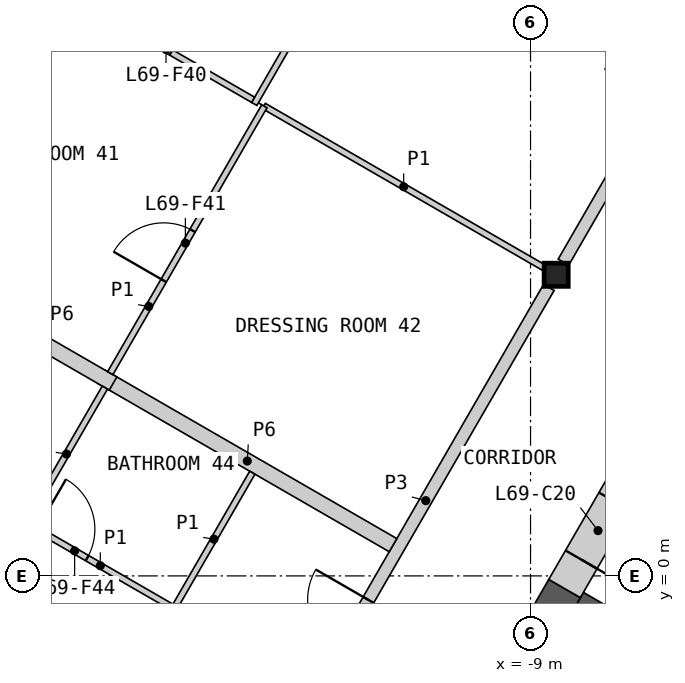
"""IFC4 building model, lengths in metres.
Left out: names, types, materials, properties, quantities, classifications, styles, units other than length and angle.
Written with IfcOpenShell. Run it as: python <this file> out.ifc"""

import sys

from ifc_helpers import new_model, si_unit, direction, frame, frame_2d, origin, origin_2d, place, context, subcontext, project, spatial, polyline, rectangle, i_section, outline, extrude, element, fill, save


model = new_model("IFC4")
c1 = context("Model", 3, precision=1e-05, world=origin(), true_north=direction((0.0, 1.0)))
c2 = subcontext(c1, "Body", "Model", "MODEL_VIEW")
j1 = project(units=[si_unit("LENGTHUNIT", "METRE"), si_unit("PLANEANGLEUNIT", "RADIAN")], contexts=[c1])
p1 = place(None, origin())
s1 = spatial("IfcSite", under=j1, at=p1, CompositionType="ELEMENT")
p2 = place(p1, origin())
s2 = spatial("IfcBuilding", under=s1, at=p2, CompositionType="ELEMENT")
p3 = place(p2, frame((0.0, 0.0, 315.4)))
s3 = spatial("IfcBuildingStorey", under=s2, at=p3, CompositionType="ELEMENT", Elevation=315.4)
p4 = place(p3, frame((-8.578, 4.953, 0.0), z_axis=(0.0, 0.0, 1.0), x_axis=(1.0, 0.0, 0.0)))
e1 = element("IfcColumn", 1, at=p4, inside=s3, PredefinedType="COLUMN", context=c2, shape_type="SweptSolid", body=[
    extrude(i_section(OverallWidth=0.396, OverallDepth=0.381, WebThickness=0.019, FlangeThickness=0.03, at=origin_2d()), origin(), (0.0, 0.0, 1.0), 3.4),
])
p5 = place(p3, origin())
e2 = element("IfcWall", 2, at=p5, inside=s3, PredefinedType="SHEAR", context=c2, shape_type="SweptSolid", body=[
    extrude(outline(polyline([(-6.061, -1.697), (-8.231, -0.444), (-8.131, -0.271), (-5.96, -1.524), (-6.061, -1.697)])), origin(), (0.0, 0.0, 1.0), 3.1),
])
p6 = place(p3, frame((-8.44, -0.208, 0.0), z_axis=(0.0, 0.0, 1.0), x_axis=(-0.500007425856, -0.866021116422, 0.0)))
e3 = element("IfcWall", 3, at=p6, inside=s3, PredefinedType="SHEAR", context=c2, shape_type="SweptSolid", body=[
    extrude(rectangle(XDim=4.969, YDim=0.6, at=frame_2d((2.484, 0.0))), origin(), (0.0, 0.0, 1.0), 3.1),
])
p7 = place(p3, frame((-7.34, 1.698, 0.0), z_axis=(0.0, 0.0, 1.0), x_axis=(-0.50002983664, -0.866008176907, 0.0)))
e4 = element("IfcWall", 4, at=p7, inside=s3, PredefinedType="SHEAR", context=c2, shape_type="SweptSolid", body=[
    extrude(rectangle(XDim=2.2, YDim=0.6, at=frame_2d((1.1, 0.0))), origin(), (0.0, 0.0, 1.0), 3.1),
])
p8 = place(p7, frame((0.55, 0.0, 0.0)))
e5 = element("IfcOpeningElement", 5, at=p8, cuts=e4, PredefinedType="OPENING", context=c2, shape_type="SweptSolid", body=[
    extrude(rectangle(XDim=1.1, YDim=2.1, at=frame_2d((0.55, 1.05))), frame((0.0, 0.31, 0.0), z_axis=(0.0, -1.0, 0.0), x_axis=(1.0, 0.0, 0.0)), (0.0, 0.0, 1.0), 0.62),
])
p9 = place(p3, frame((-8.458, 5.16, 0.0), z_axis=(0.0, 0.0, 1.0), x_axis=(0.499984266882, 0.866034487114, 0.0)))
e6 = element("IfcWall", 6, at=p9, inside=s3, PredefinedType="PARTITIONING", context=c2, shape_type="SweptSolid", body=[
    extrude(rectangle(XDim=8.099, YDim=0.2, at=frame_2d((4.049, 0.0))), origin(), (0.0, 0.0, 1.0), 3.1),
])
p10 = place(p9, frame((3.093, 0.0, 0.0)))
e7 = element("IfcOpeningElement", 7, at=p10, cuts=e6, PredefinedType="OPENING", context=c2, shape_type="SweptSolid", body=[
    extrude(rectangle(XDim=1.0, YDim=2.1, at=frame_2d((0.5, 1.05))), frame((0.0, 0.11, 0.0), z_axis=(0.0, -1.0, 0.0), x_axis=(1.0, 0.0, 0.0)), (0.0, 0.0, 1.0), 0.22),
])
p11 = place(p3, frame((-12.748, -2.269, 0.0), z_axis=(0.0, 0.0, 1.0), x_axis=(0.499984266882, 0.866034487114, 0.0)))
e8 = element("IfcWall", 8, at=p11, inside=s3, PredefinedType="PARTITIONING", context=c2, shape_type="SweptSolid", body=[
    extrude(rectangle(XDim=8.099, YDim=0.2, at=frame_2d((4.049, 0.0))), origin(), (0.0, 0.0, 1.0), 3.1),
])
p12 = place(p11, frame((1.164, 0.0, 0.0)))
e9 = element("IfcOpeningElement", 9, at=p12, cuts=e8, PredefinedType="OPENING", context=c2, shape_type="SweptSolid", body=[
    extrude(rectangle(XDim=1.0, YDim=2.1, at=frame_2d((0.5, 1.05))), frame((0.0, 0.11, 0.0), z_axis=(0.0, -1.0, 0.0), x_axis=(1.0, 0.0, 0.0)), (0.0, 0.0, 1.0), 0.22),
])
p13 = place(p3, frame((-16.055, 3.273, 0.0), z_axis=(0.0, 0.0, 1.0), x_axis=(0.866019581949, -0.500010083578, 0.0)))
e10 = element("IfcWall", 10, at=p13, inside=s3, PredefinedType="PARTITIONING", context=c2, shape_type="SweptSolid", body=[
    extrude(rectangle(XDim=5.535, YDim=0.25, at=frame_2d((2.768, 0.0))), origin(), (0.0, 0.0, 1.0), 2.33),
])
p14 = place(p3, frame((-18.092, 4.449, 0.0), z_axis=(0.0, 0.0, 1.0), x_axis=(0.866043267704, -0.499969057507, 0.0)))
e11 = element("IfcWall", 11, at=p14, inside=s3, PredefinedType="PARTITIONING", context=c2, shape_type="SweptSolid", body=[
    extrude(rectangle(XDim=2.571, YDim=0.25, at=frame_2d((1.286, 0.0))), origin(), (0.0, 0.0, 1.0), 2.33),
])
p15 = place(p3, frame((-24.815, 2.334, 0.0), z_axis=(0.0, 0.0, 1.0), x_axis=(0.866024591023, -0.500001407741, 0.0)))
e12 = element("IfcWall", 12, at=p15, inside=s3, PredefinedType="PARTITIONING", context=c2, shape_type="SweptSolid", body=[
    extrude(rectangle(XDim=12.652, YDim=0.1, at=frame_2d((6.326, 0.0))), origin(), (0.0, 0.0, 1.0), 2.33),
])
p16 = place(p15, frame((2.95, 0.0, 0.0)))
e13 = element("IfcOpeningElement", 13, at=p16, cuts=e12, PredefinedType="OPENING", context=c2, shape_type="SweptSolid", body=[
    extrude(rectangle(XDim=0.95, YDim=2.1, at=frame_2d((0.475, 1.05))), frame((0.0, 0.06, 0.0), z_axis=(0.0, -1.0, 0.0), x_axis=(1.0, 0.0, 0.0)), (0.0, 0.0, 1.0), 0.12),
])
p17 = place(p3, frame((-13.544, 7.762, 0.0), z_axis=(0.0, 0.0, 1.0), x_axis=(0.499993819111, 0.866028972293, 0.0)))
e14 = element("IfcWall", 14, at=p17, inside=s3, PredefinedType="PARTITIONING", context=c2, shape_type="SweptSolid", body=[
    extrude(rectangle(XDim=10.436, YDim=0.1, at=frame_2d((5.218, 0.0))), origin(), (0.0, 0.0, 1.0), 2.33),
])
p18 = place(p17, frame((3.279, 0.0, 0.0)))
e15 = element("IfcOpeningElement", 15, at=p18, cuts=e14, PredefinedType="OPENING", context=c2, shape_type="SweptSolid", body=[
    extrude(rectangle(XDim=0.95, YDim=2.1, at=frame_2d((0.475, 1.05))), frame((0.0, 0.06, 0.0), z_axis=(0.0, -1.0, 0.0), x_axis=(1.0, 0.0, 0.0)), (0.0, 0.0, 1.0), 0.12),
])
p19 = place(p3, frame((-19.615, 11.325, 0.0), z_axis=(0.0, 0.0, 1.0), x_axis=(0.866013987544, -0.500019772988, 0.0)))
e16 = element("IfcWall", 16, at=p19, inside=s3, PredefinedType="PARTITIONING", context=c2, shape_type="SweptSolid", body=[
    extrude(rectangle(XDim=6.99, YDim=0.1, at=frame_2d((3.495, 0.0))), origin(), (0.0, 0.0, 1.0), 2.33),
])
p20 = place(p19, frame((4.48, 0.0, 0.0)))
e17 = element("IfcOpeningElement", 17, at=p20, cuts=e16, PredefinedType="OPENING", context=c2, shape_type="SweptSolid", body=[
    extrude(rectangle(XDim=0.95, YDim=2.1, at=frame_2d((0.475, 1.05))), frame((0.0, 0.06, 0.0), z_axis=(0.0, -1.0, 0.0), x_axis=(1.0, 0.0, 0.0)), (0.0, 0.0, 1.0), 0.12),
])
p21 = place(p3, frame((-13.386, 7.729, 0.0), z_axis=(0.0, 0.0, 1.0), x_axis=(0.866034036823, -0.49998504684, 0.0)))
e18 = element("IfcWall", 18, at=p21, inside=s3, PredefinedType="PARTITIONING", context=c2, shape_type="SweptSolid", body=[
    extrude(rectangle(XDim=5.312, YDim=0.1, at=frame_2d((2.656, 0.0))), origin(), (0.0, 0.0, 1.0), 2.33),
])
p22 = place(p3, frame((-15.912, 3.335, 0.0), z_axis=(0.0, 0.0, 1.0), x_axis=(0.49999906822, 0.866025941747, 0.0)))
e19 = element("IfcWall", 19, at=p22, inside=s3, PredefinedType="PARTITIONING", context=c2, shape_type="SweptSolid", body=[
    extrude(rectangle(XDim=5.068, YDim=0.1, at=frame_2d((2.534, 0.0))), origin(), (0.0, 0.0, 1.0), 2.33),
])
p23 = place(p22, frame((1.757, 0.0, 0.0)))
e20 = element("IfcOpeningElement", 20, at=p23, cuts=e19, PredefinedType="OPENING", context=c2, shape_type="SweptSolid", body=[
    extrude(rectangle(XDim=0.95, YDim=2.1, at=frame_2d((0.475, 1.05))), frame((0.0, 0.06, 0.0), z_axis=(0.0, -1.0, 0.0), x_axis=(1.0, 0.0, 0.0)), (0.0, 0.0, 1.0), 0.12),
])
p24 = place(p3, frame((-17.331, 0.892, 0.0), z_axis=(0.0, 0.0, 1.0), x_axis=(0.866032775405, -0.499987231761, 0.0)))
e21 = element("IfcWall", 21, at=p24, inside=s3, PredefinedType="PARTITIONING", context=c2, shape_type="SweptSolid", body=[
    extrude(rectangle(XDim=2.9, YDim=0.1, at=frame_2d((1.45, 0.0))), origin(), (0.0, 0.0, 1.0), 2.33),
])
p25 = place(p24, frame((0.25, 0.0, 0.0)))
e22 = element("IfcOpeningElement", 22, at=p25, cuts=e21, PredefinedType="OPENING", context=c2, shape_type="SweptSolid", body=[
    extrude(rectangle(XDim=0.95, YDim=2.1, at=frame_2d((0.475, 1.05))), frame((0.0, 0.06, 0.0), z_axis=(0.0, -1.0, 0.0), x_axis=(1.0, 0.0, 0.0)), (0.0, 0.0, 1.0), 0.12),
])
for number, where, z_axis, x_axis in (
    (23, (-14.838, -0.489, 0.0), (0.0, 0.0, 1.0), (0.5, 0.866, 0.0)),
    (24, (-17.263, 0.911, 0.0), (0.0, 0.0, 1.0), (0.5, 0.866, 0.0)),
):
    element("IfcWall", number, at=place(p3, frame(where, z_axis=z_axis, x_axis=x_axis)), inside=s3, PredefinedType="PARTITIONING", context=c2, shape_type="SweptSolid", body=[
        extrude(rectangle(XDim=2.525, YDim=0.1, at=frame_2d((1.262, 0.0))), origin(), (0.0, 0.0, 1.0), 2.33),
    ])
p26 = place(p8, origin())
e25 = element("IfcDoor", 25, at=p26, inside=s3, OperationType="SINGLE_SWING_RIGHT", PredefinedType="DOOR", context=c2, shape_type="SweptSolid", body=[
    extrude(rectangle(XDim=1.1, YDim=2.1, at=frame_2d((0.55, 1.05))), frame((0.0, 0.055, 0.0), z_axis=(0.0, -1.0, 0.0), x_axis=(1.0, 0.0, 0.0)), (0.0, 0.0, 1.0), 0.05),
])
fill(e5, e25)
p27 = place(p20, origin())
e26 = element("IfcDoor", 26, at=p27, inside=s3, OperationType="SINGLE_SWING_LEFT", PredefinedType="DOOR", context=c2, shape_type="SweptSolid", body=[
    extrude(rectangle(XDim=0.95, YDim=2.1, at=frame_2d((0.475, 1.05))), frame((0.0, 0.025, 0.0), z_axis=(0.0, -1.0, 0.0), x_axis=(1.0, 0.0, 0.0)), (0.0, 0.0, 1.0), 0.05),
])
fill(e17, e26)
p28 = place(p23, origin())
e27 = element("IfcDoor", 27, at=p28, inside=s3, OperationType="SINGLE_SWING_LEFT", PredefinedType="DOOR", context=c2, shape_type="SweptSolid", body=[
    extrude(rectangle(XDim=0.95, YDim=2.1, at=frame_2d((0.475, 1.05))), frame((0.0, 0.025, 0.0), z_axis=(0.0, -1.0, 0.0), x_axis=(1.0, 0.0, 0.0)), (0.0, 0.0, 1.0), 0.05),
])
fill(e20, e27)
p29 = place(p12, origin())
e28 = element("IfcDoor", 28, at=p29, inside=s3, OperationType="SINGLE_SWING_RIGHT", PredefinedType="DOOR", context=c2, shape_type="SweptSolid", body=[
    extrude(rectangle(XDim=1.0, YDim=2.1, at=frame_2d((0.5, 1.05))), frame((0.0, 0.025, 0.0), z_axis=(0.0, -1.0, 0.0), x_axis=(1.0, 0.0, 0.0)), (0.0, 0.0, 1.0), 0.05),
])
fill(e9, e28)
p30 = place(p25, origin())
e29 = element("IfcDoor", 29, at=p30, inside=s3, OperationType="SINGLE_SWING_LEFT", PredefinedType="DOOR", context=c2, shape_type="SweptSolid", body=[
    extrude(rectangle(XDim=0.95, YDim=2.1, at=frame_2d((0.475, 1.05))), frame((0.0, 0.025, 0.0), z_axis=(0.0, -1.0, 0.0), x_axis=(1.0, 0.0, 0.0)), (0.0, 0.0, 1.0), 0.05),
])
fill(e22, e29)
save(model, sys.argv[1])
